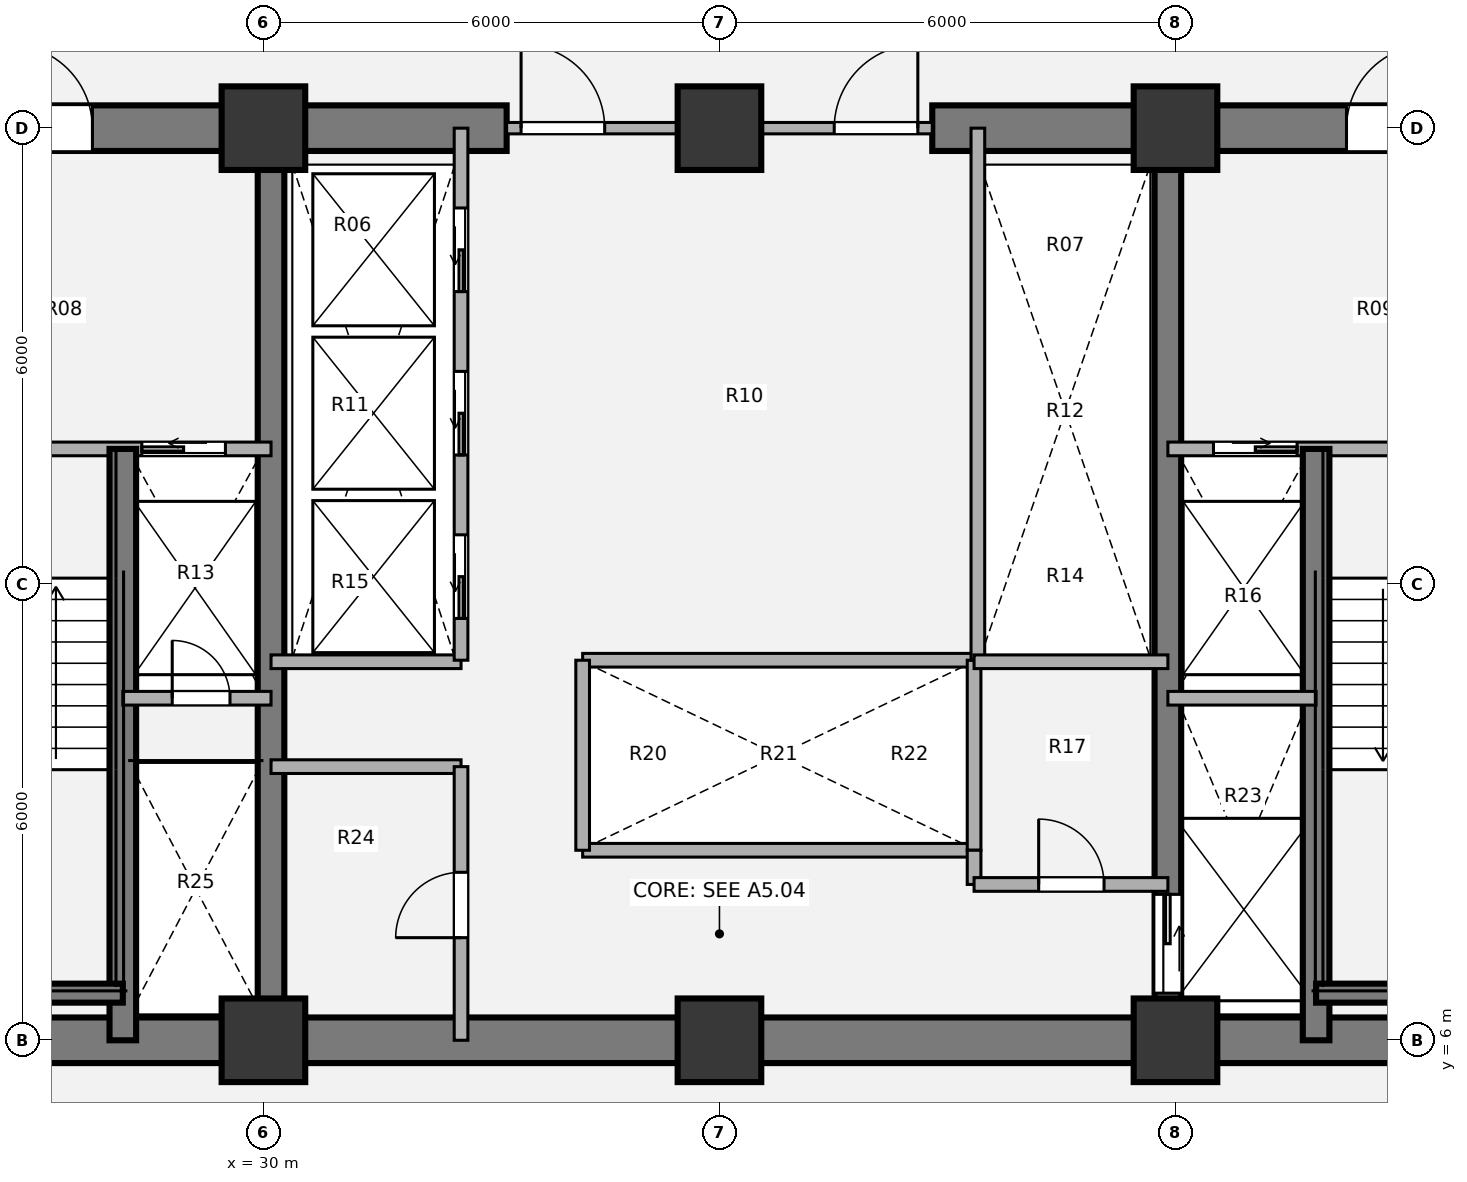
"""IFC4 building model, lengths in metres.
Left out: names, types, materials, properties, quantities, classifications, styles, units other than length and angle.
Written with IfcOpenShell. Run it as: python <this file> out.ifc"""

import sys

from ifc_helpers import new_model, si_unit, direction, frame, frame_2d, origin, origin_2d, place, context, subcontext, project, spatial, rectangle, extrude, source, transform, mapped, element, fill, save


model = new_model("IFC4")
c1 = context("Model", 3, precision=1e-05, world=origin(), true_north=direction((0.0, 1.0)))
c2 = subcontext(c1, "Body", "Model", "MODEL_VIEW")
j1 = project(units=[si_unit("LENGTHUNIT", "METRE"), si_unit("PLANEANGLEUNIT", "RADIAN")], contexts=[c1])
p1 = place(None, origin())
s1 = spatial("IfcSite", under=j1, at=p1, CompositionType="ELEMENT")
p2 = place(p1, origin())
s2 = spatial("IfcBuilding", under=s1, at=p2, CompositionType="ELEMENT")
p3 = place(p2, frame((0.0, 0.0, 61.02)))
s3 = spatial("IfcBuildingStorey", under=s2, at=p3, CompositionType="ELEMENT", Elevation=61.02)
m1 = source(origin(), c2, "Body", "SweptSolid", [
    extrude(rectangle(XDim=1.1, YDim=1.1, at=origin_2d()), origin(), (0.0, 0.0, 1.0), 3.78),
])
for number, where, z_axis, x_axis in (
    (1, (30.0, 6.0, 0.0), (0.0, 0.0, 1.0), (1.0, 0.0, 0.0)),
    (2, (36.0, 6.0, 0.0), (0.0, 0.0, 1.0), (1.0, 0.0, 0.0)),
    (3, (42.0, 6.0, 0.0), (0.0, 0.0, 1.0), (1.0, 0.0, 0.0)),
    (4, (30.0, 18.0, 0.0), (0.0, 0.0, 1.0), (1.0, 0.0, 0.0)),
    (5, (36.0, 18.0, 0.0), (0.0, 0.0, 1.0), (1.0, 0.0, 0.0)),
    (6, (42.0, 18.0, 0.0), (0.0, 0.0, 1.0), (1.0, 0.0, 0.0)),
):
    element("IfcColumn", number, at=place(p3, frame(where, z_axis=z_axis, x_axis=x_axis)), inside=s3, PredefinedType="COLUMN", context=c2, shape_type="MappedRepresentation", body=[
        mapped(m1, transform((0.0, 0.0, 0.0), x_axis=(1.0, 0.0, 0.0), y_axis=(0.0, 1.0, 0.0), z_axis=(0.0, 0.0, 1.0), scale=1.0)),
    ])
p4 = place(p3, frame((48.3, 6.0, 0.0), z_axis=(0.0, 0.0, 1.0), x_axis=(-1.0, 0.0, 0.0)))
e7 = element("IfcWall", 7, at=p4, inside=s3, PredefinedType="SHEAR", context=c2, shape_type="SweptSolid", body=[
    extrude(rectangle(XDim=24.6, YDim=0.6, at=frame_2d((12.3, 0.0))), origin(), (0.0, 0.0, 1.0), 3.78),
])
p5 = place(p3, frame((23.7, 18.0, 0.0), z_axis=(0.0, 0.0, 1.0), x_axis=(1.0, 0.0, 0.0)))
e8 = element("IfcWall", 8, at=p5, inside=s3, PredefinedType="SHEAR", context=c2, shape_type="SweptSolid", body=[
    extrude(rectangle(XDim=9.5, YDim=0.6, at=frame_2d((4.75, 0.0))), origin(), (0.0, 0.0, 1.0), 3.78),
])
p6 = place(p5, frame((2.95, 0.0, 0.0)))
e9 = element("IfcOpeningElement", 9, at=p6, cuts=e8, PredefinedType="OPENING", context=c2, shape_type="SweptSolid", body=[
    extrude(rectangle(XDim=1.1, YDim=2.1, at=origin_2d()), frame((0.55, 0.31, 1.05), z_axis=(0.0, -1.0, 0.0), x_axis=(1.0, 0.0, 0.0)), (0.0, 0.0, 1.0), 0.62),
])
p7 = place(p3, frame((38.8, 18.0, 0.0), z_axis=(0.0, 0.0, 1.0), x_axis=(1.0, 0.0, 0.0)))
e10 = element("IfcWall", 10, at=p7, inside=s3, PredefinedType="SHEAR", context=c2, shape_type="SweptSolid", body=[
    extrude(rectangle(XDim=9.5, YDim=0.6, at=frame_2d((4.75, 0.0))), origin(), (0.0, 0.0, 1.0), 3.78),
])
p8 = place(p7, frame((5.45, 0.0, 0.0)))
e11 = element("IfcOpeningElement", 11, at=p8, cuts=e10, PredefinedType="OPENING", context=c2, shape_type="SweptSolid", body=[
    extrude(rectangle(XDim=1.1, YDim=2.1, at=origin_2d()), frame((0.55, 0.31, 1.05), z_axis=(0.0, -1.0, 0.0), x_axis=(1.0, 0.0, 0.0)), (0.0, 0.0, 1.0), 0.62),
])
p9 = place(p3, frame((30.1, 6.0, 0.0), z_axis=(0.0, 0.0, 1.0), x_axis=(0.0, 1.0, 0.0)))
e12 = element("IfcWall", 12, at=p9, inside=s3, PredefinedType="SHEAR", context=c2, shape_type="SweptSolid", body=[
    extrude(rectangle(XDim=12.0, YDim=0.35, at=frame_2d((6.0, 0.0))), origin(), (0.0, 0.0, 1.0), 3.78),
])
p10 = place(p3, frame((41.9, 18.0, 0.0), z_axis=(0.0, 0.0, 1.0), x_axis=(0.0, -1.0, 0.0)))
e13 = element("IfcWall", 13, at=p10, inside=s3, PredefinedType="SHEAR", context=c2, shape_type="SweptSolid", body=[
    extrude(rectangle(XDim=12.0, YDim=0.35, at=frame_2d((6.0, 0.0))), origin(), (0.0, 0.0, 1.0), 3.78),
])
p11 = place(p10, frame((10.08, 0.0, 0.0)))
e14 = element("IfcOpeningElement", 14, at=p11, cuts=e13, PredefinedType="OPENING", context=c2, shape_type="SweptSolid", body=[
    extrude(rectangle(XDim=1.3, YDim=2.1, at=origin_2d()), frame((0.65, 0.185, 1.05), z_axis=(0.0, -1.0, 0.0), x_axis=(1.0, 0.0, 0.0)), (0.0, 0.0, 1.0), 0.37),
])
for number, where, z_axis, x_axis in (
    (15, (34.2, 11.0, 0.0), (0.0, 0.0, 1.0), (1.0, 0.0, 0.0)),
    (16, (34.2, 8.5, 0.0), (0.0, 0.0, 1.0), (1.0, 0.0, 0.0)),
):
    element("IfcWall", number, at=place(p3, frame(where, z_axis=z_axis, x_axis=x_axis)), inside=s3, PredefinedType="PARTITIONING", context=c2, shape_type="SweptSolid", body=[
        extrude(rectangle(XDim=5.15, YDim=0.18, at=frame_2d((2.575, 0.0))), origin(), (0.0, 0.0, 1.0), 3.5),
    ])
for number, where, z_axis, x_axis in (
    (17, (34.2, 8.5, 0.0), (0.0, 0.0, 1.0), (0.0, 1.0, 0.0)),
    (18, (39.35, 8.5, 0.0), (0.0, 0.0, 1.0), (0.0, 1.0, 0.0)),
):
    element("IfcWall", number, at=place(p3, frame(where, z_axis=z_axis, x_axis=x_axis)), inside=s3, PredefinedType="PARTITIONING", context=c2, shape_type="SweptSolid", body=[
        extrude(rectangle(XDim=2.5, YDim=0.18, at=frame_2d((1.25, 0.0))), origin(), (0.0, 0.0, 1.0), 3.5),
    ])
p12 = place(p3, frame((39.4, 11.0, 0.0), z_axis=(0.0, 0.0, 1.0), x_axis=(0.0, 1.0, 0.0)))
e19 = element("IfcWall", 19, at=p12, inside=s3, PredefinedType="PARTITIONING", context=c2, shape_type="SweptSolid", body=[
    extrude(rectangle(XDim=7.0, YDim=0.18, at=frame_2d((3.5, 0.0))), origin(), (0.0, 0.0, 1.0), 3.5),
])
for number, where, z_axis, x_axis in (
    (20, (30.1, 10.98, 0.0), (0.0, 0.0, 1.0), (1.0, 0.0, 0.0)),
    (21, (30.1, 9.6, 0.0), (0.0, 0.0, 1.0), (1.0, 0.0, 0.0)),
):
    element("IfcWall", number, at=place(p3, frame(where, z_axis=z_axis, x_axis=x_axis)), inside=s3, PredefinedType="PARTITIONING", context=c2, shape_type="SweptSolid", body=[
        extrude(rectangle(XDim=2.5, YDim=0.18, at=frame_2d((1.25, 0.0))), origin(), (0.0, 0.0, 1.0), 3.5),
    ])
p13 = place(p3, frame((32.6, 6.0, 0.0), z_axis=(0.0, 0.0, 1.0), x_axis=(0.0, 1.0, 0.0)))
e22 = element("IfcWall", 22, at=p13, inside=s3, PredefinedType="PARTITIONING", context=c2, shape_type="SweptSolid", body=[
    extrude(rectangle(XDim=3.6, YDim=0.18, at=frame_2d((1.8, 0.0))), origin(), (0.0, 0.0, 1.0), 3.5),
])
p14 = place(p13, frame((1.35, 0.0, 0.0)))
e23 = element("IfcOpeningElement", 23, at=p14, cuts=e22, PredefinedType="OPENING", context=c2, shape_type="SweptSolid", body=[
    extrude(rectangle(XDim=0.86, YDim=2.1, at=origin_2d()), frame((0.43, 0.1, 1.05), z_axis=(0.0, -1.0, 0.0), x_axis=(1.0, 0.0, 0.0)), (0.0, 0.0, 1.0), 0.2),
])
p15 = place(p3, frame((39.35, 10.98, 0.0), z_axis=(0.0, 0.0, 1.0), x_axis=(1.0, 0.0, 0.0)))
e24 = element("IfcWall", 24, at=p15, inside=s3, PredefinedType="PARTITIONING", context=c2, shape_type="SweptSolid", body=[
    extrude(rectangle(XDim=2.55, YDim=0.18, at=frame_2d((1.275, 0.0))), origin(), (0.0, 0.0, 1.0), 3.5),
])
p16 = place(p3, frame((39.35, 8.05, 0.0), z_axis=(0.0, 0.0, 1.0), x_axis=(0.0, 1.0, 0.0)))
e25 = element("IfcWall", 25, at=p16, inside=s3, PredefinedType="PARTITIONING", context=c2, shape_type="SweptSolid", body=[
    extrude(rectangle(XDim=0.45, YDim=0.18, at=frame_2d((0.225, 0.0))), origin(), (0.0, 0.0, 1.0), 3.5),
])
p17 = place(p3, frame((39.35, 8.05, 0.0), z_axis=(0.0, 0.0, 1.0), x_axis=(1.0, 0.0, 0.0)))
e26 = element("IfcWall", 26, at=p17, inside=s3, PredefinedType="PARTITIONING", context=c2, shape_type="SweptSolid", body=[
    extrude(rectangle(XDim=2.55, YDim=0.18, at=frame_2d((1.275, 0.0))), origin(), (0.0, 0.0, 1.0), 3.5),
])
p18 = place(p17, frame((0.85, 0.0, 0.0)))
e27 = element("IfcOpeningElement", 27, at=p18, cuts=e26, PredefinedType="OPENING", context=c2, shape_type="SweptSolid", body=[
    extrude(rectangle(XDim=0.86, YDim=2.1, at=origin_2d()), frame((0.43, 0.1, 1.05), z_axis=(0.0, -1.0, 0.0), x_axis=(1.0, 0.0, 0.0)), (0.0, 0.0, 1.0), 0.2),
])
p19 = place(p3, frame((33.2, 18.0, 0.0), z_axis=(0.0, 0.0, 1.0), x_axis=(1.0, 0.0, 0.0)))
e28 = element("IfcWall", 28, at=p19, inside=s3, PredefinedType="PARTITIONING", context=c2, shape_type="SweptSolid", body=[
    extrude(rectangle(XDim=5.6, YDim=0.15, at=frame_2d((2.8, 0.0))), origin(), (0.0, 0.0, 1.0), 2.315),
])
p20 = place(p19, frame((0.19, 0.0, 0.0)))
e29 = element("IfcOpeningElement", 29, at=p20, cuts=e28, PredefinedType="OPENING", context=c2, shape_type="SweptSolid", body=[
    extrude(rectangle(XDim=1.1, YDim=2.1, at=origin_2d()), frame((0.55, 0.085, 1.05), z_axis=(0.0, -1.0, 0.0), x_axis=(1.0, 0.0, 0.0)), (0.0, 0.0, 1.0), 0.17),
])
p21 = place(p19, frame((4.31, 0.0, 0.0)))
e30 = element("IfcOpeningElement", 30, at=p21, cuts=e28, PredefinedType="OPENING", context=c2, shape_type="SweptSolid", body=[
    extrude(rectangle(XDim=1.1, YDim=2.1, at=origin_2d()), frame((0.55, 0.085, 1.05), z_axis=(0.0, -1.0, 0.0), x_axis=(1.0, 0.0, 0.0)), (0.0, 0.0, 1.0), 0.17),
])
p22 = place(p3, frame((24.0, 13.78, 0.0), z_axis=(0.0, 0.0, 1.0), x_axis=(1.0, 0.0, 0.0)))
e31 = element("IfcWall", 31, at=p22, inside=s3, PredefinedType="PARTITIONING", context=c2, shape_type="SweptSolid", body=[
    extrude(rectangle(XDim=6.1, YDim=0.18, at=frame_2d((3.05, 0.0))), origin(), (0.0, 0.0, 1.0), 3.5),
])
p23 = place(p22, frame((1.15, 0.0, 0.0)))
e32 = element("IfcOpeningElement", 32, at=p23, cuts=e31, PredefinedType="OPENING", context=c2, shape_type="SweptSolid", body=[
    extrude(rectangle(XDim=1.1, YDim=2.1, at=origin_2d()), frame((0.55, 0.1, 1.05), z_axis=(0.0, -1.0, 0.0), x_axis=(1.0, 0.0, 0.0)), (0.0, 0.0, 1.0), 0.2),
])
p24 = place(p22, frame((4.4, 0.0, 0.0)))
e33 = element("IfcOpeningElement", 33, at=p24, cuts=e31, PredefinedType="OPENING", context=c2, shape_type="SweptSolid", body=[
    extrude(rectangle(XDim=1.1, YDim=2.1, at=origin_2d()), frame((0.55, 0.1, 1.05), z_axis=(0.0, -1.0, 0.0), x_axis=(1.0, 0.0, 0.0)), (0.0, 0.0, 1.0), 0.2),
])
p25 = place(p3, frame((28.15, 6.0, 0.0), z_axis=(0.0, 0.0, 1.0), x_axis=(0.0, 1.0, 0.0)))
e34 = element("IfcWall", 34, at=p25, inside=s3, PredefinedType="SHEAR", context=c2, shape_type="SweptSolid", body=[
    extrude(rectangle(XDim=7.78, YDim=0.35, at=frame_2d((3.89, 0.0))), origin(), (0.0, 0.0, 1.0), 3.85),
])
p26 = place(p3, frame((24.58, 6.62, 0.0), z_axis=(0.0, 0.0, 1.0), x_axis=(1.0, 0.0, 0.0)))
e35 = element("IfcWall", 35, at=p26, inside=s3, PredefinedType="SHEAR", context=c2, shape_type="SweptSolid", body=[
    extrude(rectangle(XDim=3.57, YDim=0.25, at=frame_2d((1.785, 0.0))), origin(), (0.0, 0.0, 1.0), 3.85),
])
p27 = place(p3, frame((28.15, 10.5, 0.0), z_axis=(0.0, 0.0, 1.0), x_axis=(1.0, 0.0, 0.0)))
e36 = element("IfcWall", 36, at=p27, inside=s3, PredefinedType="PARTITIONING", context=c2, shape_type="SweptSolid", body=[
    extrude(rectangle(XDim=1.95, YDim=0.18, at=frame_2d((0.975, 0.0))), origin(), (0.0, 0.0, 1.0), 3.5),
])
p28 = place(p27, frame((0.65, 0.0, 0.0)))
e37 = element("IfcOpeningElement", 37, at=p28, cuts=e36, PredefinedType="OPENING", context=c2, shape_type="SweptSolid", body=[
    extrude(rectangle(XDim=0.76, YDim=2.05, at=origin_2d()), frame((0.38, 0.1, 1.025), z_axis=(0.0, -1.0, 0.0), x_axis=(1.0, 0.0, 0.0)), (0.0, 0.0, 1.0), 0.2),
])
p29 = place(p3, frame((41.9, 13.78, 0.0), z_axis=(0.0, 0.0, 1.0), x_axis=(1.0, 0.0, 0.0)))
e38 = element("IfcWall", 38, at=p29, inside=s3, PredefinedType="PARTITIONING", context=c2, shape_type="SweptSolid", body=[
    extrude(rectangle(XDim=6.1, YDim=0.18, at=frame_2d((3.05, 0.0))), origin(), (0.0, 0.0, 1.0), 3.5),
])
p30 = place(p29, frame((0.6, 0.0, 0.0)))
e39 = element("IfcOpeningElement", 39, at=p30, cuts=e38, PredefinedType="OPENING", context=c2, shape_type="SweptSolid", body=[
    extrude(rectangle(XDim=1.1, YDim=2.1, at=origin_2d()), frame((0.55, 0.1, 1.05), z_axis=(0.0, -1.0, 0.0), x_axis=(1.0, 0.0, 0.0)), (0.0, 0.0, 1.0), 0.2),
])
p31 = place(p29, frame((3.8, 0.0, 0.0)))
e40 = element("IfcOpeningElement", 40, at=p31, cuts=e38, PredefinedType="OPENING", context=c2, shape_type="SweptSolid", body=[
    extrude(rectangle(XDim=1.1, YDim=2.1, at=origin_2d()), frame((0.55, 0.1, 1.05), z_axis=(0.0, -1.0, 0.0), x_axis=(1.0, 0.0, 0.0)), (0.0, 0.0, 1.0), 0.2),
])
p32 = place(p3, frame((43.85, 6.0, 0.0), z_axis=(0.0, 0.0, 1.0), x_axis=(0.0, 1.0, 0.0)))
e41 = element("IfcWall", 41, at=p32, inside=s3, PredefinedType="SHEAR", context=c2, shape_type="SweptSolid", body=[
    extrude(rectangle(XDim=7.78, YDim=0.35, at=frame_2d((3.89, 0.0))), origin(), (0.0, 0.0, 1.0), 3.85),
])
p33 = place(p3, frame((43.85, 6.62, 0.0), z_axis=(0.0, 0.0, 1.0), x_axis=(1.0, 0.0, 0.0)))
e42 = element("IfcWall", 42, at=p33, inside=s3, PredefinedType="SHEAR", context=c2, shape_type="SweptSolid", body=[
    extrude(rectangle(XDim=3.57, YDim=0.25, at=frame_2d((1.785, 0.0))), origin(), (0.0, 0.0, 1.0), 3.85),
])
p34 = place(p3, frame((41.9, 10.5, 0.0), z_axis=(0.0, 0.0, 1.0), x_axis=(1.0, 0.0, 0.0)))
e43 = element("IfcWall", 43, at=p34, inside=s3, PredefinedType="PARTITIONING", context=c2, shape_type="SweptSolid", body=[
    extrude(rectangle(XDim=1.95, YDim=0.18, at=frame_2d((0.975, 0.0))), origin(), (0.0, 0.0, 1.0), 3.5),
])
p35 = place(p3, frame((32.6, 11.0, 0.0), z_axis=(0.0, 0.0, 1.0), x_axis=(0.0, 1.0, 0.0)))
e44 = element("IfcWall", 44, at=p35, inside=s3, PredefinedType="PARTITIONING", context=c2, shape_type="SweptSolid", body=[
    extrude(rectangle(XDim=7.0, YDim=0.18, at=frame_2d((3.5, 0.0))), origin(), (0.0, 0.0, 1.0), 3.5),
])
p36 = place(p35, frame((0.55, 0.0, 0.0)))
e45 = element("IfcOpeningElement", 45, at=p36, cuts=e44, PredefinedType="OPENING", context=c2, shape_type="SweptSolid", body=[
    extrude(rectangle(XDim=1.1, YDim=2.1, at=origin_2d()), frame((0.55, 0.1, 1.05), z_axis=(0.0, -1.0, 0.0), x_axis=(1.0, 0.0, 0.0)), (0.0, 0.0, 1.0), 0.2),
])
p37 = place(p35, frame((2.7, 0.0, 0.0)))
e46 = element("IfcOpeningElement", 46, at=p37, cuts=e44, PredefinedType="OPENING", context=c2, shape_type="SweptSolid", body=[
    extrude(rectangle(XDim=1.1, YDim=2.1, at=origin_2d()), frame((0.55, 0.1, 1.05), z_axis=(0.0, -1.0, 0.0), x_axis=(1.0, 0.0, 0.0)), (0.0, 0.0, 1.0), 0.2),
])
p38 = place(p35, frame((4.85, 0.0, 0.0)))
e47 = element("IfcOpeningElement", 47, at=p38, cuts=e44, PredefinedType="OPENING", context=c2, shape_type="SweptSolid", body=[
    extrude(rectangle(XDim=1.1, YDim=2.1, at=origin_2d()), frame((0.55, 0.1, 1.05), z_axis=(0.0, -1.0, 0.0), x_axis=(1.0, 0.0, 0.0)), (0.0, 0.0, 1.0), 0.2),
])
m2 = source(origin(), c2, "Body", "SweptSolid", [
    extrude(rectangle(XDim=0.86, YDim=2.1, at=origin_2d()), frame((0.43, 0.025, 1.05), z_axis=(0.0, -1.0, 0.0), x_axis=(1.0, 0.0, 0.0)), (0.0, 0.0, 1.0), 0.05),
])
p39 = place(p14, origin())
e48 = element("IfcDoor", 48, at=p39, inside=s3, OperationType="SINGLE_SWING_LEFT", PredefinedType="DOOR", context=c2, shape_type="MappedRepresentation", body=[
    mapped(m2, transform((0.0, 0.0, 0.0), x_axis=(1.0, 0.0, 0.0), y_axis=(0.0, 1.0, 0.0), z_axis=(0.0, 0.0, 1.0), scale=1.0)),
])
fill(e23, e48)
p40 = place(p18, origin())
e49 = element("IfcDoor", 49, at=p40, inside=s3, OperationType="SINGLE_SWING_LEFT", PredefinedType="DOOR", context=c2, shape_type="MappedRepresentation", body=[
    mapped(m2, transform((0.0, 0.0, 0.0), x_axis=(1.0, 0.0, 0.0), y_axis=(0.0, 1.0, 0.0), z_axis=(0.0, 0.0, 1.0), scale=1.0)),
])
fill(e27, e49)
m3 = source(origin(), c2, "Body", "SweptSolid", [
    extrude(rectangle(XDim=1.1, YDim=2.1, at=origin_2d()), frame((0.55, 0.025, 1.05), z_axis=(0.0, -1.0, 0.0), x_axis=(1.0, 0.0, 0.0)), (0.0, 0.0, 1.0), 0.05),
])
p41 = place(p20, origin())
e50 = element("IfcDoor", 50, at=p41, inside=s3, OperationType="SINGLE_SWING_LEFT", PredefinedType="DOOR", context=c2, shape_type="MappedRepresentation", body=[
    mapped(m3, transform((0.0, 0.0, 0.0), x_axis=(1.0, 0.0, 0.0), y_axis=(0.0, 1.0, 0.0), z_axis=(0.0, 0.0, 1.0), scale=1.0)),
])
fill(e29, e50)
p42 = place(p21, origin())
e51 = element("IfcDoor", 51, at=p42, inside=s3, OperationType="SINGLE_SWING_RIGHT", PredefinedType="DOOR", context=c2, shape_type="MappedRepresentation", body=[
    mapped(m3, transform((0.0, 0.0, 0.0), x_axis=(1.0, 0.0, 0.0), y_axis=(0.0, 1.0, 0.0), z_axis=(0.0, 0.0, 1.0), scale=1.0)),
])
fill(e30, e51)
m4 = source(origin(), c2, "Body", "SweptSolid", [
    extrude(rectangle(XDim=1.1, YDim=2.1, at=origin_2d()), frame((0.55, 0.025, 1.05), z_axis=(0.0, -1.0, 0.0), x_axis=(1.0, 0.0, 0.0)), (0.0, 0.0, 1.0), 0.05),
])
p43 = place(p24, origin())
e52 = element("IfcDoor", 52, at=p43, inside=s3, OperationType="SLIDING_TO_LEFT", PredefinedType="DOOR", context=c2, shape_type="MappedRepresentation", body=[
    mapped(m4, transform((0.0, 0.0, 0.0), x_axis=(1.0, 0.0, 0.0), y_axis=(0.0, 1.0, 0.0), z_axis=(0.0, 0.0, 1.0), scale=1.0)),
])
fill(e33, e52)
m5 = source(origin(), c2, "Body", "SweptSolid", [
    extrude(rectangle(XDim=0.76, YDim=2.05, at=origin_2d()), frame((0.38, 0.025, 1.025), z_axis=(0.0, -1.0, 0.0), x_axis=(1.0, 0.0, 0.0)), (0.0, 0.0, 1.0), 0.05),
])
p44 = place(p28, origin())
e53 = element("IfcDoor", 53, at=p44, inside=s3, OperationType="SINGLE_SWING_LEFT", PredefinedType="DOOR", context=c2, shape_type="MappedRepresentation", body=[
    mapped(m5, transform((0.0, 0.0, 0.0), x_axis=(1.0, 0.0, 0.0), y_axis=(0.0, 1.0, 0.0), z_axis=(0.0, 0.0, 1.0), scale=1.0)),
])
fill(e37, e53)
p45 = place(p30, origin())
e54 = element("IfcDoor", 54, at=p45, inside=s3, OperationType="SLIDING_TO_RIGHT", PredefinedType="DOOR", context=c2, shape_type="MappedRepresentation", body=[
    mapped(m4, transform((0.0, 0.0, 0.0), x_axis=(1.0, 0.0, 0.0), y_axis=(0.0, 1.0, 0.0), z_axis=(0.0, 0.0, 1.0), scale=1.0)),
])
fill(e39, e54)
m6 = source(origin(), c2, "Body", "SweptSolid", [
    extrude(rectangle(XDim=1.3, YDim=2.1, at=origin_2d()), frame((0.65, 0.025, 1.05), z_axis=(0.0, -1.0, 0.0), x_axis=(1.0, 0.0, 0.0)), (0.0, 0.0, 1.0), 0.05),
])
p46 = place(p11, origin())
e55 = element("IfcDoor", 55, at=p46, inside=s3, OperationType="SLIDING_TO_LEFT", PredefinedType="DOOR", context=c2, shape_type="MappedRepresentation", body=[
    mapped(m6, transform((0.0, 0.0, 0.0), x_axis=(1.0, 0.0, 0.0), y_axis=(0.0, 1.0, 0.0), z_axis=(0.0, 0.0, 1.0), scale=1.0)),
])
fill(e14, e55)
p47 = place(p6, origin())
e56 = element("IfcDoor", 56, at=p47, inside=s3, OperationType="SINGLE_SWING_LEFT", PredefinedType="DOOR", context=c2, shape_type="MappedRepresentation", body=[
    mapped(m3, transform((0.0, 0.0, 0.0), x_axis=(1.0, 0.0, 0.0), y_axis=(0.0, 1.0, 0.0), z_axis=(0.0, 0.0, 1.0), scale=1.0)),
])
fill(e9, e56)
p48 = place(p8, origin())
e57 = element("IfcDoor", 57, at=p48, inside=s3, OperationType="SINGLE_SWING_RIGHT", PredefinedType="DOOR", context=c2, shape_type="MappedRepresentation", body=[
    mapped(m3, transform((0.0, 0.0, 0.0), x_axis=(1.0, 0.0, 0.0), y_axis=(0.0, 1.0, 0.0), z_axis=(0.0, 0.0, 1.0), scale=1.0)),
])
fill(e11, e57)
p49 = place(p36, origin())
e58 = element("IfcDoor", 58, at=p49, inside=s3, OperationType="SLIDING_TO_LEFT", PredefinedType="DOOR", context=c2, shape_type="MappedRepresentation", body=[
    mapped(m4, transform((0.0, 0.0, 0.0), x_axis=(1.0, 0.0, 0.0), y_axis=(0.0, 1.0, 0.0), z_axis=(0.0, 0.0, 1.0), scale=1.0)),
])
fill(e45, e58)
p50 = place(p37, origin())
e59 = element("IfcDoor", 59, at=p50, inside=s3, OperationType="SLIDING_TO_LEFT", PredefinedType="DOOR", context=c2, shape_type="MappedRepresentation", body=[
    mapped(m4, transform((0.0, 0.0, 0.0), x_axis=(1.0, 0.0, 0.0), y_axis=(0.0, 1.0, 0.0), z_axis=(0.0, 0.0, 1.0), scale=1.0)),
])
fill(e46, e59)
p51 = place(p38, origin())
e60 = element("IfcDoor", 60, at=p51, inside=s3, OperationType="SLIDING_TO_LEFT", PredefinedType="DOOR", context=c2, shape_type="MappedRepresentation", body=[
    mapped(m4, transform((0.0, 0.0, 0.0), x_axis=(1.0, 0.0, 0.0), y_axis=(0.0, 1.0, 0.0), z_axis=(0.0, 0.0, 1.0), scale=1.0)),
])
fill(e47, e60)
save(model, sys.argv[1])
